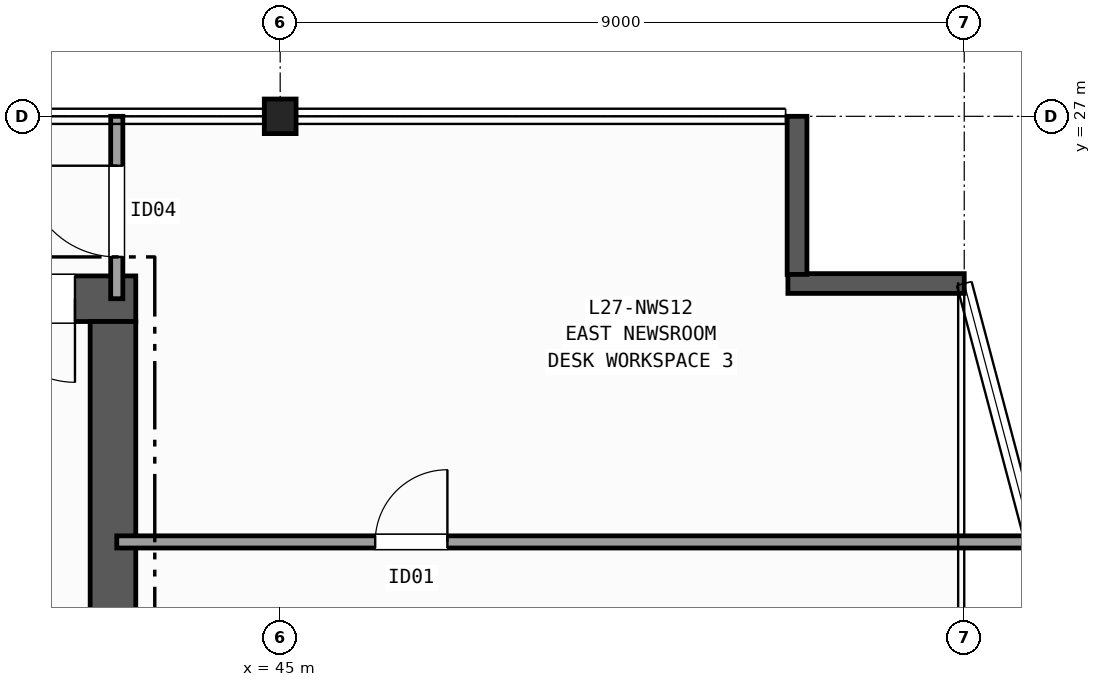
"""IFC4 building model, lengths in metres.
Left out: names, types, materials, properties, quantities, classifications, styles, units other than length and angle.
Written with IfcOpenShell. Run it as: python <this file> out.ifc"""

import sys

from ifc_helpers import new_model, si_unit, direction, frame, frame_2d, origin, origin_2d, place, context, subcontext, project, spatial, rectangle, i_section, extrude, element, fill, save


model = new_model("IFC4")
c1 = context("Model", 3, precision=1e-05, world=origin(), true_north=direction((0.0, 1.0)))
c2 = subcontext(c1, "Body", "Model", "MODEL_VIEW")
j1 = project(units=[si_unit("LENGTHUNIT", "METRE"), si_unit("PLANEANGLEUNIT", "RADIAN")], contexts=[c1])
p1 = place(None, origin())
s1 = spatial("IfcSite", under=j1, at=p1, CompositionType="ELEMENT")
p2 = place(p1, origin())
s2 = spatial("IfcBuilding", under=s1, at=p2, CompositionType="ELEMENT")
p3 = place(p2, frame((0.0, 0.0, 113.7)))
s3 = spatial("IfcBuildingStorey", under=s2, at=p3, CompositionType="ELEMENT", Elevation=113.7)
p4 = place(p3, frame((45.0, 27.0, 0.0), z_axis=(0.0, 0.0, 1.0), x_axis=(1.0, 0.0, 0.0)))
e1 = element("IfcColumn", 1, at=p4, inside=s3, PredefinedType="COLUMN", context=c2, shape_type="SweptSolid", body=[
    extrude(i_section(OverallWidth=0.418, OverallDepth=0.455, WebThickness=0.042, FlangeThickness=0.068, FilletRadius=0.015, at=origin_2d()), origin(), (0.0, 0.0, 1.0), 3.7),
])
p5 = place(p3, frame((54.0, 24.8, 0.0), z_axis=(0.0, 0.0, 1.0), x_axis=(-1.0, 0.0, 0.0)))
e2 = element("IfcWall", 2, at=p5, inside=s3, PredefinedType="SOLIDWALL", context=c2, shape_type="SweptSolid", body=[
    extrude(rectangle(XDim=2.32, YDim=0.26, at=frame_2d((1.16, 0.0))), origin(), (0.0, 0.0, 1.0), 3.42),
])
p6 = place(p3, frame((51.8, 24.92, 0.0), z_axis=(0.0, 0.0, 1.0), x_axis=(0.0, 1.0, 0.0)))
e3 = element("IfcWall", 3, at=p6, inside=s3, PredefinedType="SOLIDWALL", context=c2, shape_type="SweptSolid", body=[
    extrude(rectangle(XDim=2.08, YDim=0.26, at=frame_2d((1.04, 0.0))), origin(), (0.0, 0.0, 1.0), 3.42),
])
p7 = place(p3, frame((43.1, 24.6, 0.0), z_axis=(0.0, 0.0, 1.0), x_axis=(-1.0, 0.0, 0.0)))
e4 = element("IfcWall", 4, at=p7, inside=s3, PredefinedType="SHEAR", context=c2, shape_type="SweptSolid", body=[
    extrude(rectangle(XDim=14.0, YDim=0.6, at=frame_2d((7.0, 0.0))), origin(), (0.0, 0.0, 1.0), 3.42),
])
p8 = place(p7, frame((0.8, 0.0, 0.0)))
e5 = element("IfcOpeningElement", 5, at=p8, cuts=e4, PredefinedType="OPENING", context=c2, shape_type="SweptSolid", body=[
    extrude(rectangle(XDim=1.1, YDim=2.15, at=frame_2d((0.55, 1.075))), frame((0.0, 0.31, 0.0), z_axis=(0.0, -1.0, 0.0), x_axis=(1.0, 0.0, 0.0)), (0.0, 0.0, 1.0), 0.62),
])
p9 = place(p7, frame((2.75, 0.0, 0.0)))
e6 = element("IfcOpeningElement", 6, at=p9, cuts=e4, PredefinedType="OPENING", context=c2, shape_type="SweptSolid", body=[
    extrude(rectangle(XDim=0.9, YDim=2.1, at=frame_2d((0.45, 1.05))), frame((0.0, 0.31, 0.0), z_axis=(0.0, -1.0, 0.0), x_axis=(1.0, 0.0, 0.0)), (0.0, 0.0, 1.0), 0.62),
])
p10 = place(p7, frame((4.65, 0.0, 0.0)))
e7 = element("IfcOpeningElement", 7, at=p10, cuts=e4, PredefinedType="OPENING", context=c2, shape_type="SweptSolid", body=[
    extrude(rectangle(XDim=0.9, YDim=2.1, at=frame_2d((0.45, 1.05))), frame((0.0, 0.31, 0.0), z_axis=(0.0, -1.0, 0.0), x_axis=(1.0, 0.0, 0.0)), (0.0, 0.0, 1.0), 0.62),
])
p11 = place(p3, frame((42.8, 11.5, 0.0), z_axis=(0.0, 0.0, 1.0), x_axis=(0.0, 1.0, 0.0)))
e8 = element("IfcWall", 8, at=p11, inside=s3, PredefinedType="SHEAR", context=c2, shape_type="SweptSolid", body=[
    extrude(rectangle(XDim=12.8, YDim=0.6, at=frame_2d((6.4, 0.0))), origin(), (0.0, 0.0, 1.0), 3.42),
])
p12 = place(p3, frame((42.85, 24.6, 0.0), z_axis=(0.0, 0.0, 1.0), x_axis=(0.0, 1.0, 0.0)))
e9 = element("IfcWall", 9, at=p12, inside=s3, PredefinedType="PARTITIONING", context=c2, shape_type="SweptSolid", body=[
    extrude(rectangle(XDim=2.4, YDim=0.16, at=frame_2d((1.2, 0.0))), origin(), (0.0, 0.0, 1.0), 2.634),
])
p13 = place(p12, frame((0.55, 0.0, 0.0)))
e10 = element("IfcOpeningElement", 10, at=p13, cuts=e9, PredefinedType="OPENING", context=c2, shape_type="SweptSolid", body=[
    extrude(rectangle(XDim=1.2, YDim=2.15, at=frame_2d((0.6, 1.075))), frame((0.0, 0.09, 0.0), z_axis=(0.0, -1.0, 0.0), x_axis=(1.0, 0.0, 0.0)), (0.0, 0.0, 1.0), 0.18),
])
p14 = place(p3, frame((42.85, 21.4, 0.0), z_axis=(0.0, 0.0, 1.0), x_axis=(1.0, 0.0, 0.0)))
e11 = element("IfcWall", 11, at=p14, inside=s3, PredefinedType="PARTITIONING", context=c2, shape_type="SweptSolid", body=[
    extrude(rectangle(XDim=12.05, YDim=0.16, at=frame_2d((6.025, 0.0))), origin(), (0.0, 0.0, 1.0), 3.42),
])
p15 = place(p14, frame((3.4, 0.0, 0.0)))
e12 = element("IfcOpeningElement", 12, at=p15, cuts=e11, PredefinedType="OPENING", context=c2, shape_type="SweptSolid", body=[
    extrude(rectangle(XDim=0.95, YDim=2.1, at=frame_2d((0.475, 1.05))), frame((0.0, 0.09, 0.0), z_axis=(0.0, -1.0, 0.0), x_axis=(1.0, 0.0, 0.0)), (0.0, 0.0, 1.0), 0.18),
])
p16 = place(p8, origin())
e13 = element("IfcDoor", 13, at=p16, inside=s3, OperationType="SINGLE_SWING_LEFT", PredefinedType="DOOR", context=c2, shape_type="SweptSolid", body=[
    extrude(rectangle(XDim=1.1, YDim=2.15, at=frame_2d((0.55, 1.075))), frame((0.0, 0.025, 0.0), z_axis=(0.0, -1.0, 0.0), x_axis=(1.0, 0.0, 0.0)), (0.0, 0.0, 1.0), 0.05),
])
fill(e5, e13)
p17 = place(p13, origin())
e14 = element("IfcDoor", 14, at=p17, inside=s3, OperationType="SINGLE_SWING_RIGHT", PredefinedType="DOOR", context=c2, shape_type="SweptSolid", body=[
    extrude(rectangle(XDim=1.2, YDim=2.15, at=frame_2d((0.6, 1.075))), frame((0.0, 0.025, 0.0), z_axis=(0.0, -1.0, 0.0), x_axis=(1.0, 0.0, 0.0)), (0.0, 0.0, 1.0), 0.05),
])
fill(e10, e14)
p18 = place(p15, origin())
e15 = element("IfcDoor", 15, at=p18, inside=s3, OperationType="SINGLE_SWING_RIGHT", PredefinedType="DOOR", context=c2, shape_type="SweptSolid", body=[
    extrude(rectangle(XDim=0.95, YDim=2.1, at=frame_2d((0.475, 1.05))), frame((0.0, 0.025, 0.0), z_axis=(0.0, -1.0, 0.0), x_axis=(1.0, 0.0, 0.0)), (0.0, 0.0, 1.0), 0.05),
])
fill(e12, e15)
save(model, sys.argv[1])
